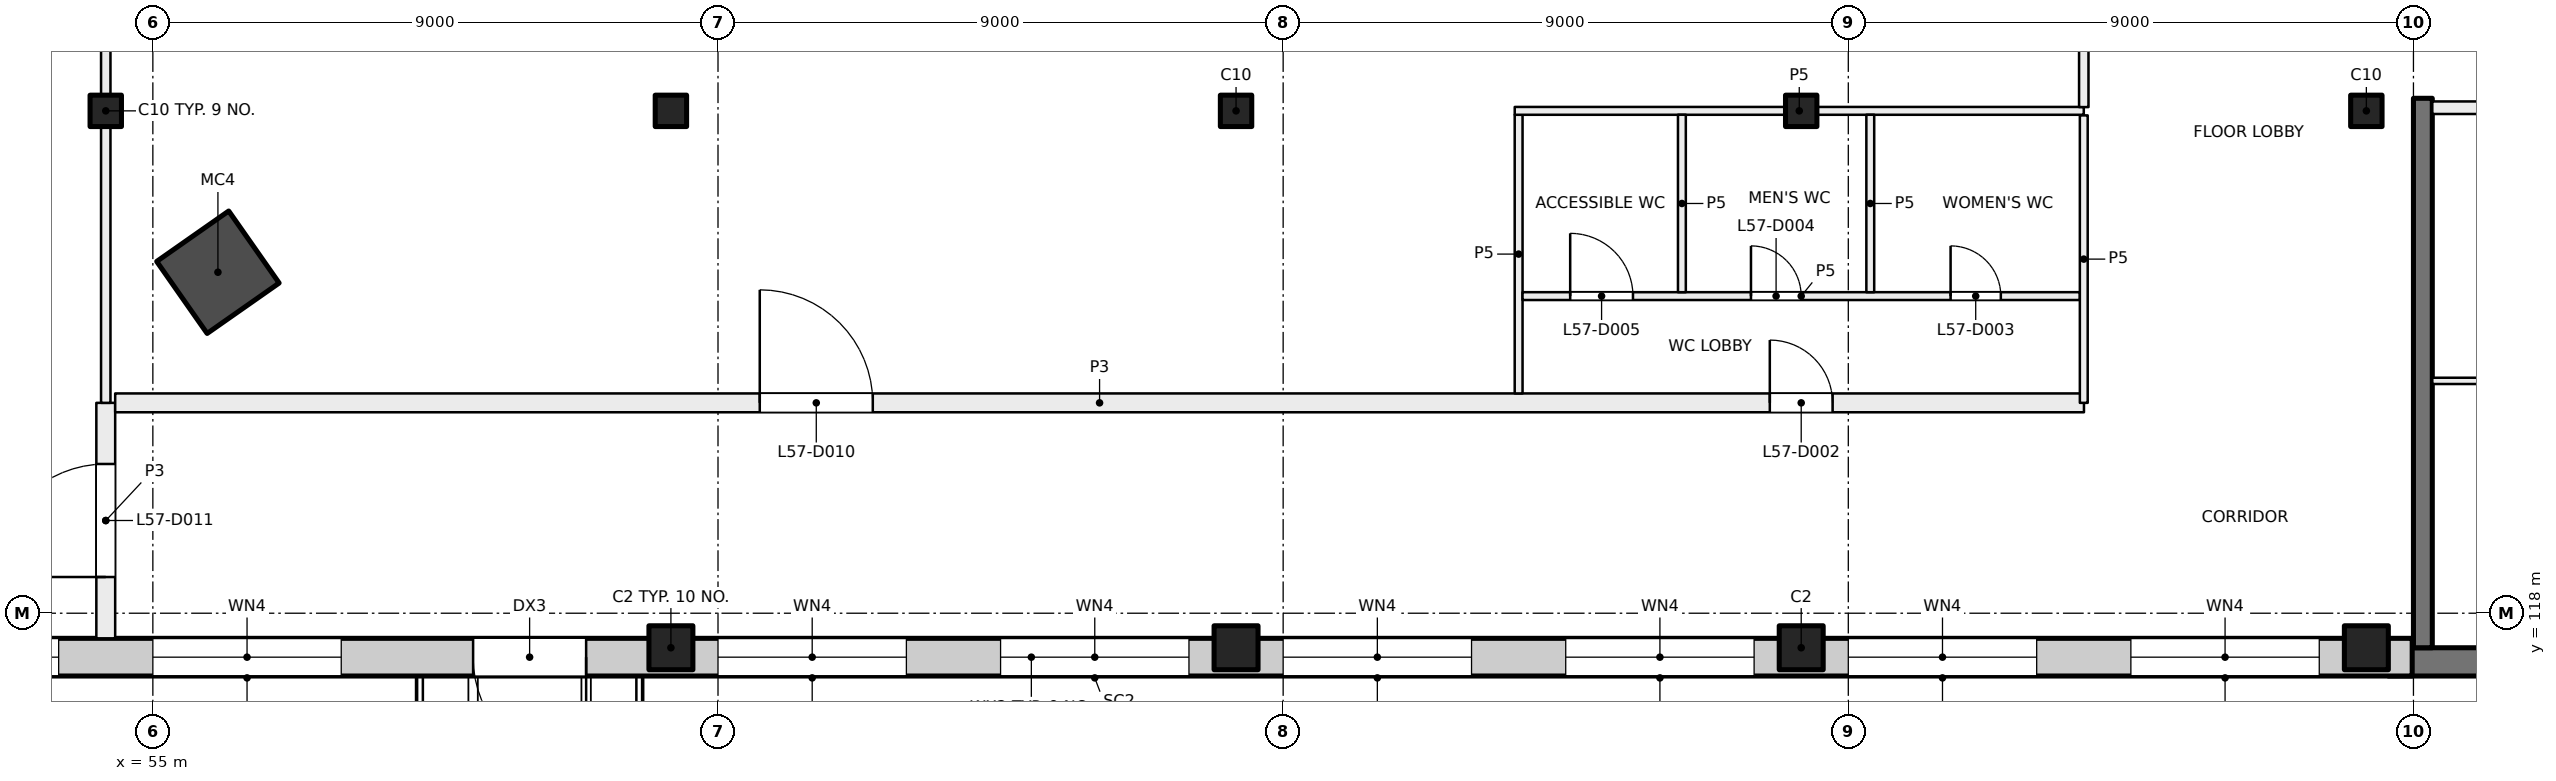
"""IFC4 building model, lengths in metres.
Left out: names, types, materials, properties, quantities, classifications, styles, units other than length and angle.
Written with IfcOpenShell. Run it as: python <this file> out.ifc"""

import sys

from ifc_helpers import new_model, si_unit, direction, frame, frame_2d, origin, origin_2d, place, context, subcontext, project, spatial, rectangle, hollow_rectangle, extrude, element, fill, save


model = new_model("IFC4")
c1 = context("Model", 3, precision=1e-05, world=origin(), true_north=direction((0.0, 1.0)))
c2 = subcontext(c1, "Body", "Model", "MODEL_VIEW")
j1 = project(units=[si_unit("LENGTHUNIT", "METRE"), si_unit("PLANEANGLEUNIT", "RADIAN")], contexts=[c1])
p1 = place(None, origin())
s1 = spatial("IfcSite", under=j1, at=p1, CompositionType="ELEMENT")
p2 = place(p1, origin())
s2 = spatial("IfcBuilding", under=s1, at=p2, CompositionType="ELEMENT")
p3 = place(p2, frame((0.0, 0.0, 241.5)))
s3 = spatial("IfcBuildingStorey", under=s2, at=p3, CompositionType="ELEMENT", Elevation=241.5)
p4 = place(p3, frame((56.036, 123.43, 0.0), z_axis=(0.0, 0.0, 1.0), x_axis=(0.573576436351, -0.819152044289, 0.0)))
e1 = element("IfcColumn", 1, at=p4, inside=s3, PredefinedType="COLUMN", context=c2, shape_type="SweptSolid", body=[
    extrude(hollow_rectangle(XDim=1.4, YDim=1.4, WallThickness=0.025, at=origin_2d()), origin(), (0.0, 0.0, 1.0), 4.0),
])
for number, where, z_axis, x_axis in (
    (2, (54.25, 126.0, 0.0), (0.0, 0.0, 1.0), (1.0, 0.0, 0.0)),
    (3, (63.25, 126.0, 0.0), (0.0, 0.0, 1.0), (1.0, 0.0, 0.0)),
    (4, (72.25, 126.0, 0.0), (0.0, 0.0, 1.0), (1.0, 0.0, 0.0)),
    (5, (81.25, 126.0, 0.0), (0.0, 0.0, 1.0), (1.0, 0.0, 0.0)),
    (6, (90.25, 126.0, 0.0), (0.0, 0.0, 1.0), (1.0, 0.0, 0.0)),
):
    element("IfcColumn", number, at=place(p3, frame(where, z_axis=z_axis, x_axis=x_axis)), inside=s3, PredefinedType="COLUMN", context=c2, shape_type="SweptSolid", body=[
        extrude(rectangle(XDim=0.5, YDim=0.5, at=origin_2d()), origin(), (0.0, 0.0, 1.0), 4.0),
    ])
for number, where, z_axis, x_axis in (
    (7, (63.25, 117.45, 0.0), (0.0, 0.0, 1.0), (1.0, 0.0, 0.0)),
    (8, (72.25, 117.45, 0.0), (0.0, 0.0, 1.0), (1.0, 0.0, 0.0)),
    (9, (81.25, 117.45, 0.0), (0.0, 0.0, 1.0), (1.0, 0.0, 0.0)),
    (10, (90.25, 117.45, 0.0), (0.0, 0.0, 1.0), (1.0, 0.0, 0.0)),
):
    element("IfcColumn", number, at=place(p3, frame(where, z_axis=z_axis, x_axis=x_axis)), inside=s3, PredefinedType="COLUMN", context=c2, shape_type="SweptSolid", body=[
        extrude(rectangle(XDim=0.7, YDim=0.7, at=origin_2d()), origin(), (0.0, 0.0, 1.0), 4.0),
    ])
p5 = place(p3, frame((99.6, 117.225, 0.0), z_axis=(0.0, 0.0, 1.0), x_axis=(-1.0, 0.0, 0.0)))
e11 = element("IfcWall", 11, at=p5, inside=s3, PredefinedType="SHEAR", context=c2, shape_type="SweptSolid", body=[
    extrude(rectangle(XDim=9.0, YDim=0.45, at=frame_2d((4.5, 0.0))), origin(), (0.0, 0.0, 1.0), 4.0),
])
p6 = place(p3, frame((91.15, 126.2, 0.0), z_axis=(0.0, 0.0, 1.0), x_axis=(0.0, -1.0, 0.0)))
e12 = element("IfcWall", 12, at=p6, inside=s3, PredefinedType="SHEAR", context=c2, shape_type="SweptSolid", body=[
    extrude(rectangle(XDim=8.75, YDim=0.3, at=frame_2d((4.375, 0.0))), origin(), (0.0, 0.0, 1.0), 4.0),
])
p7 = place(p3, frame((90.98, 117.3, 0.0), z_axis=(0.0, 0.0, 1.0), x_axis=(-1.0, 0.0, 0.0)))
e13 = element("IfcWall", 13, at=p7, inside=s3, PredefinedType="SOLIDWALL", context=c2, shape_type="SweptSolid", body=[
    extrude(rectangle(XDim=43.98, YDim=0.6, at=frame_2d((21.99, 0.0))), origin(), (0.0, 0.0, 1.0), 3.625),
])
p8 = place(p7, frame((1.48, 0.0, 0.9)))
e14 = element("IfcOpeningElement", 14, at=p8, cuts=e13, PredefinedType="OPENING", context=c2, shape_type="SweptSolid", body=[
    extrude(rectangle(XDim=3.0, YDim=2.4, at=frame_2d((1.5, 1.2))), frame((0.0, 0.31, 0.0), z_axis=(0.0, -1.0, 0.0), x_axis=(1.0, 0.0, 0.0)), (0.0, 0.0, 1.0), 0.62),
])
p9 = place(p7, frame((5.98, 0.0, 0.9)))
e15 = element("IfcOpeningElement", 15, at=p9, cuts=e13, PredefinedType="OPENING", context=c2, shape_type="SweptSolid", body=[
    extrude(rectangle(XDim=3.0, YDim=2.4, at=frame_2d((1.5, 1.2))), frame((0.0, 0.31, 0.0), z_axis=(0.0, -1.0, 0.0), x_axis=(1.0, 0.0, 0.0)), (0.0, 0.0, 1.0), 0.62),
])
p10 = place(p7, frame((10.48, 0.0, 0.9)))
e16 = element("IfcOpeningElement", 16, at=p10, cuts=e13, PredefinedType="OPENING", context=c2, shape_type="SweptSolid", body=[
    extrude(rectangle(XDim=3.0, YDim=2.4, at=frame_2d((1.5, 1.2))), frame((0.0, 0.31, 0.0), z_axis=(0.0, -1.0, 0.0), x_axis=(1.0, 0.0, 0.0)), (0.0, 0.0, 1.0), 0.62),
])
p11 = place(p7, frame((14.98, 0.0, 0.9)))
e17 = element("IfcOpeningElement", 17, at=p11, cuts=e13, PredefinedType="OPENING", context=c2, shape_type="SweptSolid", body=[
    extrude(rectangle(XDim=3.0, YDim=2.4, at=frame_2d((1.5, 1.2))), frame((0.0, 0.31, 0.0), z_axis=(0.0, -1.0, 0.0), x_axis=(1.0, 0.0, 0.0)), (0.0, 0.0, 1.0), 0.62),
])
p12 = place(p7, frame((19.48, 0.0, 0.9)))
e18 = element("IfcOpeningElement", 18, at=p12, cuts=e13, PredefinedType="OPENING", context=c2, shape_type="SweptSolid", body=[
    extrude(rectangle(XDim=3.0, YDim=2.4, at=frame_2d((1.5, 1.2))), frame((0.0, 0.31, 0.0), z_axis=(0.0, -1.0, 0.0), x_axis=(1.0, 0.0, 0.0)), (0.0, 0.0, 1.0), 0.62),
])
p13 = place(p7, frame((23.98, 0.0, 0.9)))
e19 = element("IfcOpeningElement", 19, at=p13, cuts=e13, PredefinedType="OPENING", context=c2, shape_type="SweptSolid", body=[
    extrude(rectangle(XDim=3.0, YDim=2.4, at=frame_2d((1.5, 1.2))), frame((0.0, 0.31, 0.0), z_axis=(0.0, -1.0, 0.0), x_axis=(1.0, 0.0, 0.0)), (0.0, 0.0, 1.0), 0.62),
])
p14 = place(p7, frame((29.08, 0.0, 0.0)))
e20 = element("IfcOpeningElement", 20, at=p14, cuts=e13, PredefinedType="OPENING", context=c2, shape_type="SweptSolid", body=[
    extrude(rectangle(XDim=1.8, YDim=2.4, at=frame_2d((0.9, 1.2))), frame((0.0, 0.31, 0.0), z_axis=(0.0, -1.0, 0.0), x_axis=(1.0, 0.0, 0.0)), (0.0, 0.0, 1.0), 0.62),
])
p15 = place(p7, frame((32.98, 0.0, 0.9)))
e21 = element("IfcOpeningElement", 21, at=p15, cuts=e13, PredefinedType="OPENING", context=c2, shape_type="SweptSolid", body=[
    extrude(rectangle(XDim=3.0, YDim=2.4, at=frame_2d((1.5, 1.2))), frame((0.0, 0.31, 0.0), z_axis=(0.0, -1.0, 0.0), x_axis=(1.0, 0.0, 0.0)), (0.0, 0.0, 1.0), 0.62),
])
p16 = place(p7, frame((37.48, 0.0, 0.9)))
e22 = element("IfcOpeningElement", 22, at=p16, cuts=e13, PredefinedType="OPENING", context=c2, shape_type="SweptSolid", body=[
    extrude(rectangle(XDim=3.0, YDim=2.4, at=frame_2d((1.5, 1.2))), frame((0.0, 0.31, 0.0), z_axis=(0.0, -1.0, 0.0), x_axis=(1.0, 0.0, 0.0)), (0.0, 0.0, 1.0), 0.62),
])
p17 = place(p3, frame((95.25, 126.05, 0.0), z_axis=(0.0, 0.0, 1.0), x_axis=(-1.0, 0.0, 0.0)))
e23 = element("IfcWall", 23, at=p17, inside=s3, PredefinedType="PARTITIONING", context=c2, shape_type="SweptSolid", body=[
    extrude(rectangle(XDim=3.95, YDim=0.2, at=frame_2d((1.975, 0.0))), origin(), (0.0, 0.0, 1.0), 3.625),
])
p18 = place(p17, frame((0.3, 0.0, 0.0)))
e24 = element("IfcOpeningElement", 24, at=p18, cuts=e23, PredefinedType="OPENING", context=c2, shape_type="SweptSolid", body=[
    extrude(rectangle(XDim=1.2, YDim=2.1, at=frame_2d((0.6, 1.05))), frame((0.0, 0.11, 0.0), z_axis=(0.0, -1.0, 0.0), x_axis=(1.0, 0.0, 0.0)), (0.0, 0.0, 1.0), 0.22),
])
p19 = place(p3, frame((93.4, 121.7, 0.0), z_axis=(0.0, 0.0, 1.0), x_axis=(-1.0, 0.0, 0.0)))
e25 = element("IfcWall", 25, at=p19, inside=s3, PredefinedType="PARTITIONING", context=c2, shape_type="SweptSolid", body=[
    extrude(rectangle(XDim=2.1, YDim=0.1, at=frame_2d((1.05, 0.0))), origin(), (0.0, 0.0, 1.0), 3.625),
])
p20 = place(p3, frame((54.25, 117.6, 0.0), z_axis=(0.0, 0.0, 1.0), x_axis=(0.0, 1.0, 0.0)))
e26 = element("IfcWall", 26, at=p20, inside=s3, PredefinedType="PARTITIONING", context=c2, shape_type="SweptSolid", body=[
    extrude(rectangle(XDim=3.75, YDim=0.3, at=frame_2d((1.875, 0.0))), origin(), (0.0, 0.0, 1.0), 3.625),
])
p21 = place(p20, frame((0.977, 0.0, 0.0)))
e27 = element("IfcOpeningElement", 27, at=p21, cuts=e26, PredefinedType="OPENING", context=c2, shape_type="SweptSolid", body=[
    extrude(rectangle(XDim=1.8, YDim=2.1, at=frame_2d((0.9, 1.05))), frame((0.0, 0.16, 0.0), z_axis=(0.0, -1.0, 0.0), x_axis=(1.0, 0.0, 0.0)), (0.0, 0.0, 1.0), 0.32),
])
p22 = place(p3, frame((54.25, 121.35, 0.0), z_axis=(0.0, 0.0, 1.0), x_axis=(0.0, 1.0, 0.0)))
e28 = element("IfcWall", 28, at=p22, inside=s3, PredefinedType="PARTITIONING", context=c2, shape_type="SweptSolid", body=[
    extrude(rectangle(XDim=17.05, YDim=0.15, at=frame_2d((8.525, 0.0))), origin(), (0.0, 0.0, 1.0), 3.625),
])
p23 = place(p3, frame((54.4, 121.35, 0.0), z_axis=(0.0, 0.0, 1.0), x_axis=(1.0, 0.0, 0.0)))
e29 = element("IfcWall", 29, at=p23, inside=s3, PredefinedType="PARTITIONING", context=c2, shape_type="SweptSolid", body=[
    extrude(rectangle(XDim=31.353, YDim=0.3, at=frame_2d((15.677, 0.0))), origin(), (0.0, 0.0, 1.0), 3.625),
])
p24 = place(p23, frame((26.35, 0.0, 0.0)))
e30 = element("IfcOpeningElement", 30, at=p24, cuts=e29, PredefinedType="OPENING", context=c2, shape_type="SweptSolid", body=[
    extrude(rectangle(XDim=1.0, YDim=2.1, at=frame_2d((0.5, 1.05))), frame((0.0, 0.16, 0.0), z_axis=(0.0, -1.0, 0.0), x_axis=(1.0, 0.0, 0.0)), (0.0, 0.0, 1.0), 0.32),
])
p25 = place(p23, frame((10.265, 0.0, 0.0)))
e31 = element("IfcOpeningElement", 31, at=p25, cuts=e29, PredefinedType="OPENING", context=c2, shape_type="SweptSolid", body=[
    extrude(rectangle(XDim=1.8, YDim=2.1, at=frame_2d((0.9, 1.05))), frame((0.0, 0.16, 0.0), z_axis=(0.0, -1.0, 0.0), x_axis=(1.0, 0.0, 0.0)), (0.0, 0.0, 1.0), 0.32),
])
p26 = place(p3, frame((76.75, 121.5, 0.0), z_axis=(0.0, 0.0, 1.0), x_axis=(0.0, 1.0, 0.0)))
e32 = element("IfcWall", 32, at=p26, inside=s3, PredefinedType="PARTITIONING", context=c2, shape_type="SweptSolid", body=[
    extrude(rectangle(XDim=4.438, YDim=0.125, at=frame_2d((2.219, 0.0))), origin(), (0.0, 0.0, 1.0), 3.625),
])
p27 = place(p3, frame((76.812, 123.05, 0.0), z_axis=(0.0, 0.0, 1.0), x_axis=(1.0, 0.0, 0.0)))
e33 = element("IfcWall", 33, at=p27, inside=s3, PredefinedType="PARTITIONING", context=c2, shape_type="SweptSolid", body=[
    extrude(rectangle(XDim=8.876, YDim=0.125, at=frame_2d((4.438, 0.0))), origin(), (0.0, 0.0, 1.0), 3.625),
])
p28 = place(p27, frame((6.817, 0.0, 0.0)))
e34 = element("IfcOpeningElement", 34, at=p28, cuts=e33, PredefinedType="OPENING", context=c2, shape_type="SweptSolid", body=[
    extrude(rectangle(XDim=0.8, YDim=2.1, at=frame_2d((0.4, 1.05))), frame((0.0, 0.073, 0.0), z_axis=(0.0, -1.0, 0.0), x_axis=(1.0, 0.0, 0.0)), (0.0, 0.0, 1.0), 0.145),
])
p29 = place(p27, frame((3.638, 0.0, 0.0)))
e35 = element("IfcOpeningElement", 35, at=p29, cuts=e33, PredefinedType="OPENING", context=c2, shape_type="SweptSolid", body=[
    extrude(rectangle(XDim=0.8, YDim=2.1, at=frame_2d((0.4, 1.05))), frame((0.0, 0.073, 0.0), z_axis=(0.0, -1.0, 0.0), x_axis=(1.0, 0.0, 0.0)), (0.0, 0.0, 1.0), 0.145),
])
p30 = place(p27, frame((0.759, 0.0, 0.0)))
e36 = element("IfcOpeningElement", 36, at=p30, cuts=e33, PredefinedType="OPENING", context=c2, shape_type="SweptSolid", body=[
    extrude(rectangle(XDim=1.0, YDim=2.1, at=frame_2d((0.5, 1.05))), frame((0.0, 0.073, 0.0), z_axis=(0.0, -1.0, 0.0), x_axis=(1.0, 0.0, 0.0)), (0.0, 0.0, 1.0), 0.145),
])
p31 = place(p3, frame((76.688, 126.0, 0.0), z_axis=(0.0, 0.0, 1.0), x_axis=(1.0, 0.0, 0.0)))
e37 = element("IfcWall", 37, at=p31, inside=s3, PredefinedType="PARTITIONING", context=c2, shape_type="SweptSolid", body=[
    extrude(rectangle(XDim=9.062, YDim=0.125, at=frame_2d((4.531, 0.0))), origin(), (0.0, 0.0, 1.0), 3.625),
])
for number, where, z_axis, x_axis in (
    (38, (79.35, 125.938, 0.0), (0.0, 0.0, 1.0), (0.0, -1.0, 0.0)),
    (39, (82.35, 125.938, 0.0), (0.0, 0.0, 1.0), (0.0, -1.0, 0.0)),
):
    element("IfcWall", number, at=place(p3, frame(where, z_axis=z_axis, x_axis=x_axis)), inside=s3, PredefinedType="PARTITIONING", context=c2, shape_type="SweptSolid", body=[
        extrude(rectangle(XDim=2.826, YDim=0.125, at=frame_2d((1.413, 0.0))), origin(), (0.0, 0.0, 1.0), 3.625),
    ])
p32 = place(p3, frame((85.75, 121.35, 0.0), z_axis=(0.0, 0.0, 1.0), x_axis=(0.0, 1.0, 0.0)))
e40 = element("IfcWall", 40, at=p32, inside=s3, PredefinedType="PARTITIONING", context=c2, shape_type="SweptSolid", body=[
    extrude(rectangle(XDim=4.578, YDim=0.125, at=frame_2d((2.289, 0.0))), origin(), (0.0, 0.0, 1.0), 3.625),
])
p33 = place(p3, frame((85.75, 126.06, 0.0), z_axis=(0.0, 0.0, 1.0), x_axis=(0.0, 1.0, 0.0)))
e41 = element("IfcWall", 41, at=p33, inside=s3, PredefinedType="PARTITIONING", context=c2, shape_type="SweptSolid", body=[
    extrude(rectangle(XDim=3.89, YDim=0.15, at=frame_2d((1.945, 0.0))), origin(), (0.0, 0.0, 1.0), 3.625),
])
p34 = place(p8, origin())
e42 = element("IfcWindow", 42, at=p34, inside=s3, PartitioningType="SINGLE_PANEL", PredefinedType="WINDOW", context=c2, shape_type="SweptSolid", body=[
    extrude(rectangle(XDim=3.0, YDim=2.4, at=frame_2d((1.5, 1.2))), frame((0.0, 0.03, 0.0), z_axis=(0.0, -1.0, 0.0), x_axis=(1.0, 0.0, 0.0)), (0.0, 0.0, 1.0), 0.06),
])
fill(e14, e42)
p35 = place(p9, origin())
e43 = element("IfcWindow", 43, at=p35, inside=s3, PartitioningType="SINGLE_PANEL", PredefinedType="WINDOW", context=c2, shape_type="SweptSolid", body=[
    extrude(rectangle(XDim=3.0, YDim=2.4, at=frame_2d((1.5, 1.2))), frame((0.0, 0.03, 0.0), z_axis=(0.0, -1.0, 0.0), x_axis=(1.0, 0.0, 0.0)), (0.0, 0.0, 1.0), 0.06),
])
fill(e15, e43)
p36 = place(p10, origin())
e44 = element("IfcWindow", 44, at=p36, inside=s3, PartitioningType="SINGLE_PANEL", PredefinedType="WINDOW", context=c2, shape_type="SweptSolid", body=[
    extrude(rectangle(XDim=3.0, YDim=2.4, at=frame_2d((1.5, 1.2))), frame((0.0, 0.03, 0.0), z_axis=(0.0, -1.0, 0.0), x_axis=(1.0, 0.0, 0.0)), (0.0, 0.0, 1.0), 0.06),
])
fill(e16, e44)
p37 = place(p11, origin())
e45 = element("IfcWindow", 45, at=p37, inside=s3, PartitioningType="SINGLE_PANEL", PredefinedType="WINDOW", context=c2, shape_type="SweptSolid", body=[
    extrude(rectangle(XDim=3.0, YDim=2.4, at=frame_2d((1.5, 1.2))), frame((0.0, 0.03, 0.0), z_axis=(0.0, -1.0, 0.0), x_axis=(1.0, 0.0, 0.0)), (0.0, 0.0, 1.0), 0.06),
])
fill(e17, e45)
p38 = place(p12, origin())
e46 = element("IfcWindow", 46, at=p38, inside=s3, PartitioningType="SINGLE_PANEL", PredefinedType="WINDOW", context=c2, shape_type="SweptSolid", body=[
    extrude(rectangle(XDim=3.0, YDim=2.4, at=frame_2d((1.5, 1.2))), frame((0.0, 0.03, 0.0), z_axis=(0.0, -1.0, 0.0), x_axis=(1.0, 0.0, 0.0)), (0.0, 0.0, 1.0), 0.06),
])
fill(e18, e46)
p39 = place(p13, origin())
e47 = element("IfcWindow", 47, at=p39, inside=s3, PartitioningType="SINGLE_PANEL", PredefinedType="WINDOW", context=c2, shape_type="SweptSolid", body=[
    extrude(rectangle(XDim=3.0, YDim=2.4, at=frame_2d((1.5, 1.2))), frame((0.0, 0.03, 0.0), z_axis=(0.0, -1.0, 0.0), x_axis=(1.0, 0.0, 0.0)), (0.0, 0.0, 1.0), 0.06),
])
fill(e19, e47)
p40 = place(p14, origin())
e48 = element("IfcDoor", 48, at=p40, inside=s3, OperationType="DOUBLE_DOOR_SINGLE_SWING", PredefinedType="DOOR", context=c2, shape_type="SweptSolid", body=[
    extrude(rectangle(XDim=1.8, YDim=2.4, at=frame_2d((0.9, 1.2))), frame((0.0, 0.025, 0.0), z_axis=(0.0, -1.0, 0.0), x_axis=(1.0, 0.0, 0.0)), (0.0, 0.0, 1.0), 0.05),
])
fill(e20, e48)
p41 = place(p15, origin())
e49 = element("IfcWindow", 49, at=p41, inside=s3, PartitioningType="SINGLE_PANEL", PredefinedType="WINDOW", context=c2, shape_type="SweptSolid", body=[
    extrude(rectangle(XDim=3.0, YDim=2.4, at=frame_2d((1.5, 1.2))), frame((0.0, 0.03, 0.0), z_axis=(0.0, -1.0, 0.0), x_axis=(1.0, 0.0, 0.0)), (0.0, 0.0, 1.0), 0.06),
])
fill(e21, e49)
p42 = place(p16, origin())
e50 = element("IfcWindow", 50, at=p42, inside=s3, PartitioningType="SINGLE_PANEL", PredefinedType="WINDOW", context=c2, shape_type="SweptSolid", body=[
    extrude(rectangle(XDim=3.0, YDim=2.4, at=frame_2d((1.5, 1.2))), frame((0.0, 0.03, 0.0), z_axis=(0.0, -1.0, 0.0), x_axis=(1.0, 0.0, 0.0)), (0.0, 0.0, 1.0), 0.06),
])
fill(e22, e50)
p43 = place(p24, origin())
e51 = element("IfcDoor", 51, at=p43, inside=s3, OperationType="SINGLE_SWING_LEFT", PredefinedType="DOOR", context=c2, shape_type="SweptSolid", body=[
    extrude(rectangle(XDim=1.0, YDim=2.1, at=frame_2d((0.5, 1.05))), frame((0.0, 0.025, 0.0), z_axis=(0.0, -1.0, 0.0), x_axis=(1.0, 0.0, 0.0)), (0.0, 0.0, 1.0), 0.05),
])
fill(e30, e51)
p44 = place(p28, origin())
e52 = element("IfcDoor", 52, at=p44, inside=s3, OperationType="SINGLE_SWING_RIGHT", PredefinedType="DOOR", context=c2, shape_type="SweptSolid", body=[
    extrude(rectangle(XDim=0.8, YDim=2.1, at=frame_2d((0.4, 1.05))), frame((0.0, 0.025, 0.0), z_axis=(0.0, -1.0, 0.0), x_axis=(1.0, 0.0, 0.0)), (0.0, 0.0, 1.0), 0.05),
])
fill(e34, e52)
p45 = place(p29, origin())
e53 = element("IfcDoor", 53, at=p45, inside=s3, OperationType="SINGLE_SWING_LEFT", PredefinedType="DOOR", context=c2, shape_type="SweptSolid", body=[
    extrude(rectangle(XDim=0.8, YDim=2.1, at=frame_2d((0.4, 1.05))), frame((0.0, 0.025, 0.0), z_axis=(0.0, -1.0, 0.0), x_axis=(1.0, 0.0, 0.0)), (0.0, 0.0, 1.0), 0.05),
])
fill(e35, e53)
p46 = place(p30, origin())
e54 = element("IfcDoor", 54, at=p46, inside=s3, OperationType="SINGLE_SWING_LEFT", PredefinedType="DOOR", context=c2, shape_type="SweptSolid", body=[
    extrude(rectangle(XDim=1.0, YDim=2.1, at=frame_2d((0.5, 1.05))), frame((0.0, 0.025, 0.0), z_axis=(0.0, -1.0, 0.0), x_axis=(1.0, 0.0, 0.0)), (0.0, 0.0, 1.0), 0.05),
])
fill(e36, e54)
p47 = place(p25, origin())
e55 = element("IfcDoor", 55, at=p47, inside=s3, OperationType="DOUBLE_DOOR_SINGLE_SWING", PredefinedType="DOOR", context=c2, shape_type="SweptSolid", body=[
    extrude(rectangle(XDim=1.8, YDim=2.1, at=frame_2d((0.9, 1.05))), frame((0.0, 0.025, 0.0), z_axis=(0.0, -1.0, 0.0), x_axis=(1.0, 0.0, 0.0)), (0.0, 0.0, 1.0), 0.05),
])
fill(e31, e55)
p48 = place(p21, origin())
e56 = element("IfcDoor", 56, at=p48, inside=s3, OperationType="DOUBLE_DOOR_SINGLE_SWING", PredefinedType="DOOR", context=c2, shape_type="SweptSolid", body=[
    extrude(rectangle(XDim=1.8, YDim=2.1, at=frame_2d((0.9, 1.05))), frame((0.0, 0.025, 0.0), z_axis=(0.0, -1.0, 0.0), x_axis=(1.0, 0.0, 0.0)), (0.0, 0.0, 1.0), 0.05),
])
fill(e27, e56)
save(model, sys.argv[1])
